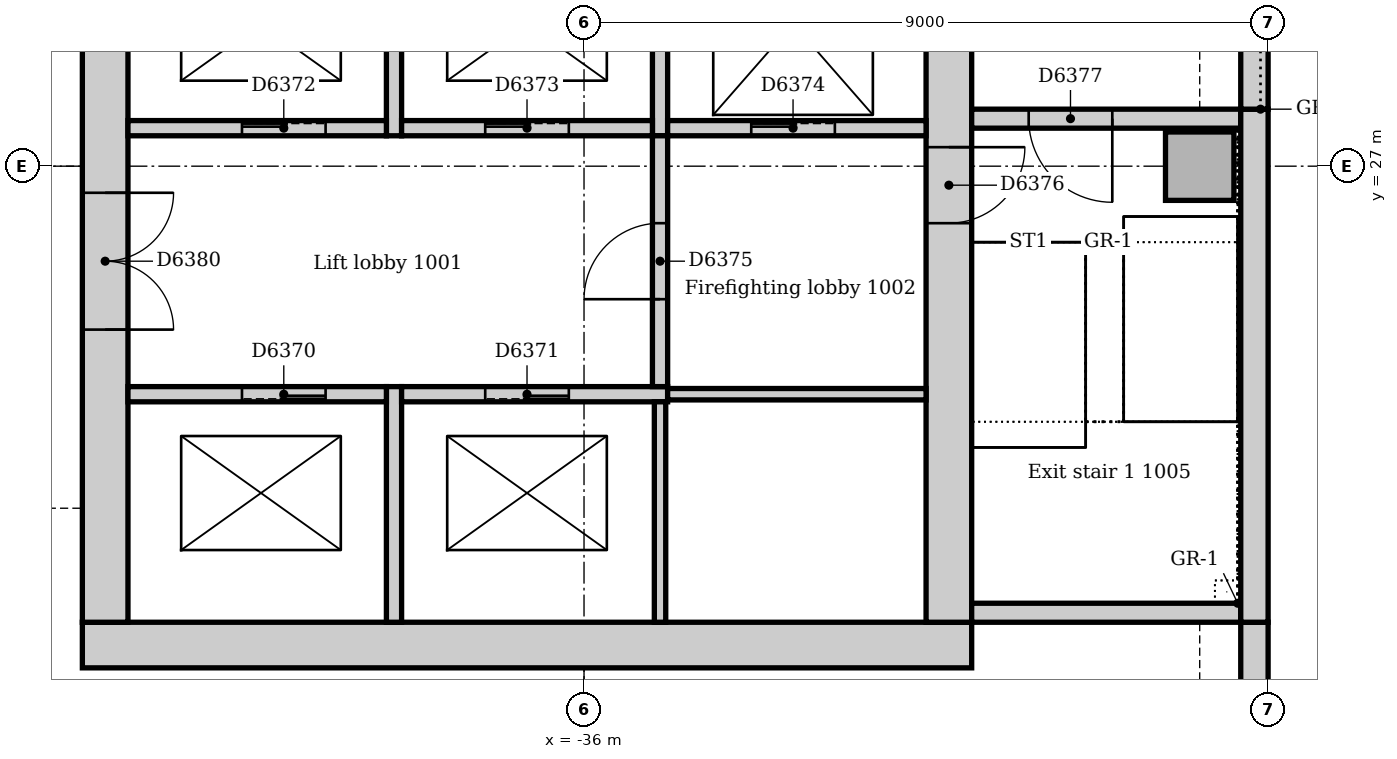
"""IFC4 building model, lengths in metres.
Left out: names, types, materials, properties, quantities, classifications, styles, units other than length and angle.
Written with IfcOpenShell. Run it as: python <this file> out.ifc"""

import sys

from ifc_helpers import new_model, si_unit, direction, frame, frame_2d, origin, origin_2d, place, context, subcontext, project, spatial, rectangle, extrude, element, fill, save


model = new_model("IFC4")
c1 = context("Model", 3, precision=1e-05, world=origin(), true_north=direction((0.0, 1.0)))
c2 = subcontext(c1, "Body", "Model", "MODEL_VIEW")
j1 = project(units=[si_unit("LENGTHUNIT", "METRE"), si_unit("PLANEANGLEUNIT", "RADIAN")], contexts=[c1])
p1 = place(None, origin())
s1 = spatial("IfcSite", under=j1, at=p1, CompositionType="ELEMENT")
p2 = place(p1, origin())
s2 = spatial("IfcBuilding", under=s1, at=p2, CompositionType="ELEMENT")
p3 = place(p2, frame((0.0, 0.0, 46.0)))
s3 = spatial("IfcBuildingStorey", under=s2, at=p3, CompositionType="ELEMENT", Elevation=46.0)
p4 = place(p3, frame((-42.6, 20.7, 0.0), z_axis=(0.0, 0.0, 1.0), x_axis=(1.0, 0.0, 0.0)))
e1 = element("IfcWall", 1, at=p4, inside=s3, PredefinedType="SOLIDWALL", context=c2, shape_type="SweptSolid", body=[
    extrude(rectangle(XDim=11.7, YDim=0.6, at=frame_2d((5.85, 0.0))), origin(), (0.0, 0.0, 1.0), 5.0),
])
p5 = place(p3, frame((-31.2, 21.0, 0.0), z_axis=(0.0, 0.0, 1.0), x_axis=(0.0, 1.0, 0.0)))
e2 = element("IfcWall", 2, at=p5, inside=s3, PredefinedType="SOLIDWALL", context=c2, shape_type="SweptSolid", body=[
    extrude(rectangle(XDim=9.5, YDim=0.6, at=frame_2d((4.75, 0.0))), origin(), (0.0, 0.0, 1.0), 5.0),
])
p6 = place(p5, frame((5.25, 0.0, 0.0)))
e3 = element("IfcOpeningElement", 3, at=p6, cuts=e2, PredefinedType="OPENING", context=c2, shape_type="SweptSolid", body=[
    extrude(rectangle(XDim=1.0, YDim=2.1, at=frame_2d((0.5, 1.05))), frame((0.0, 0.31, 0.0), z_axis=(0.0, -1.0, 0.0), x_axis=(1.0, 0.0, 0.0)), (0.0, 0.0, 1.0), 0.62),
])
p7 = place(p3, frame((-42.3, 30.5, 0.0), z_axis=(0.0, 0.0, 1.0), x_axis=(0.0, -1.0, 0.0)))
e4 = element("IfcWall", 4, at=p7, inside=s3, PredefinedType="SOLIDWALL", context=c2, shape_type="SweptSolid", body=[
    extrude(rectangle(XDim=9.5, YDim=0.6, at=frame_2d((4.75, 0.0))), origin(), (0.0, 0.0, 1.0), 5.0),
])
p8 = place(p7, frame((3.85, 0.0, 0.0)))
e5 = element("IfcOpeningElement", 5, at=p8, cuts=e4, PredefinedType="OPENING", context=c2, shape_type="SweptSolid", body=[
    extrude(rectangle(XDim=1.8, YDim=2.1, at=frame_2d((0.9, 1.05))), frame((0.0, 0.31, 0.0), z_axis=(0.0, -1.0, 0.0), x_axis=(1.0, 0.0, 0.0)), (0.0, 0.0, 1.0), 0.62),
])
p9 = place(p3, frame((-30.9, 21.125, 0.0), z_axis=(0.0, 0.0, 1.0), x_axis=(1.0, 0.0, 0.0)))
e6 = element("IfcWall", 6, at=p9, inside=s3, PredefinedType="SOLIDWALL", context=c2, shape_type="SweptSolid", body=[
    extrude(rectangle(XDim=3.54, YDim=0.25, at=frame_2d((1.77, 0.0))), origin(), (0.0, 0.0, 1.0), 5.0),
])
p10 = place(p3, frame((-27.36, 27.625, 0.0), z_axis=(0.0, 0.0, 1.0), x_axis=(-1.0, 0.0, 0.0)))
e7 = element("IfcWall", 7, at=p10, inside=s3, PredefinedType="SOLIDWALL", context=c2, shape_type="SweptSolid", body=[
    extrude(rectangle(XDim=3.54, YDim=0.25, at=frame_2d((1.77, 0.0))), origin(), (0.0, 0.0, 1.0), 5.0),
])
p11 = place(p10, frame((1.69, 0.0, 0.0)))
e8 = element("IfcOpeningElement", 8, at=p11, cuts=e7, PredefinedType="OPENING", context=c2, shape_type="SweptSolid", body=[
    extrude(rectangle(XDim=1.1, YDim=2.1, at=frame_2d((0.55, 1.05))), frame((0.0, 0.135, 0.0), z_axis=(0.0, -1.0, 0.0), x_axis=(1.0, 0.0, 0.0)), (0.0, 0.0, 1.0), 0.27),
])
p12 = place(p3, frame((-27.9, 27.0, 0.0), z_axis=(0.0, 0.0, 1.0), x_axis=(1.0, 0.0, 0.0)))
e9 = element("IfcColumn", 9, at=p12, inside=s3, PredefinedType="COLUMN", context=c2, shape_type="SweptSolid", body=[
    extrude(rectangle(XDim=0.9, YDim=0.9, at=origin_2d()), origin(), (0.0, 0.0, 1.0), 5.0),
])
p13 = place(p3, frame((-27.18, 8.743, 0.0), z_axis=(0.0, 0.0, 1.0), x_axis=(0.0, 1.0, 0.0)))
e10 = element("IfcWall", 10, at=p13, inside=s3, PredefinedType="STANDARD", context=c2, shape_type="SweptSolid", body=[
    extrude(rectangle(XDim=12.257, YDim=0.36, at=frame_2d((6.129, 0.0))), origin(), (0.0, 0.0, 1.0), 4.85),
])
p14 = place(p13, frame((3.107, 0.0, 0.9)))
e11 = element("IfcOpeningElement", 11, at=p14, cuts=e10, PredefinedType="OPENING", context=c2, shape_type="SweptSolid", body=[
    extrude(rectangle(XDim=3.3, YDim=2.2, at=frame_2d((1.65, 1.1))), frame((0.0, 0.19, 0.0), z_axis=(0.0, -1.0, 0.0), x_axis=(1.0, 0.0, 0.0)), (0.0, 0.0, 1.0), 0.38),
])
p15 = place(p13, frame((7.607, 0.0, 0.9)))
e12 = element("IfcOpeningElement", 12, at=p15, cuts=e10, PredefinedType="OPENING", context=c2, shape_type="SweptSolid", body=[
    extrude(rectangle(XDim=3.3, YDim=2.2, at=frame_2d((1.65, 1.1))), frame((0.0, 0.19, 0.0), z_axis=(0.0, -1.0, 0.0), x_axis=(1.0, 0.0, 0.0)), (0.0, 0.0, 1.0), 0.38),
])
p16 = place(p3, frame((-27.18, 21.0, 0.0), z_axis=(0.0, 0.0, 1.0), x_axis=(0.0, 1.0, 0.0)))
e13 = element("IfcWall", 13, at=p16, inside=s3, PredefinedType="STANDARD", context=c2, shape_type="SweptSolid", body=[
    extrude(rectangle(XDim=6.75, YDim=0.36, at=frame_2d((3.375, 0.0))), origin(), (0.0, 0.0, 1.0), 4.85),
])
p17 = place(p3, frame((-27.18, 27.75, 0.0), z_axis=(0.0, 0.0, 1.0), x_axis=(0.0, 1.0, 0.0)))
e14 = element("IfcWall", 14, at=p17, inside=s3, PredefinedType="STANDARD", context=c2, shape_type="SweptSolid", body=[
    extrude(rectangle(XDim=7.5, YDim=0.36, at=frame_2d((3.75, 0.0))), origin(), (0.0, 0.0, 1.0), 4.85),
])
p18 = place(p17, frame((2.85, 0.0, 1.2)))
e15 = element("IfcOpeningElement", 15, at=p18, cuts=e14, PredefinedType="OPENING", context=c2, shape_type="SweptSolid", body=[
    extrude(rectangle(XDim=1.8, YDim=1.2, at=frame_2d((0.9, 0.6))), frame((0.0, 0.19, 0.0), z_axis=(0.0, -1.0, 0.0), x_axis=(1.0, 0.0, 0.0)), (0.0, 0.0, 1.0), 0.38),
])
p19 = place(p3, frame((-38.5, 21.0, 0.0), z_axis=(0.0, 0.0, 1.0), x_axis=(0.0, 1.0, 0.0)))
e16 = element("IfcWall", 16, at=p19, inside=s3, PredefinedType="SOLIDWALL", context=c2, shape_type="SweptSolid", body=[
    extrude(rectangle(XDim=3.1, YDim=0.2, at=frame_2d((1.55, 0.0))), origin(), (0.0, 0.0, 1.0), 5.0),
])
p20 = place(p3, frame((-38.6, 24.0, 0.0), z_axis=(0.0, 0.0, 1.0), x_axis=(-1.0, 0.0, 0.0)))
e17 = element("IfcWall", 17, at=p20, inside=s3, PredefinedType="SOLIDWALL", context=c2, shape_type="SweptSolid", body=[
    extrude(rectangle(XDim=3.4, YDim=0.2, at=frame_2d((1.7, 0.0))), origin(), (0.0, 0.0, 1.0), 5.0),
])
p21 = place(p20, frame((0.8, 0.0, 0.0)))
e18 = element("IfcOpeningElement", 18, at=p21, cuts=e17, PredefinedType="OPENING", context=c2, shape_type="SweptSolid", body=[
    extrude(rectangle(XDim=1.1, YDim=2.1, at=frame_2d((0.55, 1.05))), frame((0.0, 0.11, 0.0), z_axis=(0.0, -1.0, 0.0), x_axis=(1.0, 0.0, 0.0)), (0.0, 0.0, 1.0), 0.22),
])
p22 = place(p3, frame((-34.9, 24.0, 0.0), z_axis=(0.0, 0.0, 1.0), x_axis=(-1.0, 0.0, 0.0)))
e19 = element("IfcWall", 19, at=p22, inside=s3, PredefinedType="SOLIDWALL", context=c2, shape_type="SweptSolid", body=[
    extrude(rectangle(XDim=3.5, YDim=0.2, at=frame_2d((1.75, 0.0))), origin(), (0.0, 0.0, 1.0), 5.0),
])
p23 = place(p22, frame((1.3, 0.0, 0.0)))
e20 = element("IfcOpeningElement", 20, at=p23, cuts=e19, PredefinedType="OPENING", context=c2, shape_type="SweptSolid", body=[
    extrude(rectangle(XDim=1.1, YDim=2.1, at=frame_2d((0.55, 1.05))), frame((0.0, 0.11, 0.0), z_axis=(0.0, -1.0, 0.0), x_axis=(1.0, 0.0, 0.0)), (0.0, 0.0, 1.0), 0.22),
])
p24 = place(p3, frame((-38.5, 27.4, 0.0), z_axis=(0.0, 0.0, 1.0), x_axis=(0.0, 1.0, 0.0)))
e21 = element("IfcWall", 21, at=p24, inside=s3, PredefinedType="SOLIDWALL", context=c2, shape_type="SweptSolid", body=[
    extrude(rectangle(XDim=2.85, YDim=0.2, at=frame_2d((1.425, 0.0))), origin(), (0.0, 0.0, 1.0), 5.0),
])
p25 = place(p3, frame((-42.0, 27.5, 0.0), z_axis=(0.0, 0.0, 1.0), x_axis=(1.0, 0.0, 0.0)))
e22 = element("IfcWall", 22, at=p25, inside=s3, PredefinedType="SOLIDWALL", context=c2, shape_type="SweptSolid", body=[
    extrude(rectangle(XDim=3.4, YDim=0.2, at=frame_2d((1.7, 0.0))), origin(), (0.0, 0.0, 1.0), 5.0),
])
p26 = place(p25, frame((1.5, 0.0, 0.0)))
e23 = element("IfcOpeningElement", 23, at=p26, cuts=e22, PredefinedType="OPENING", context=c2, shape_type="SweptSolid", body=[
    extrude(rectangle(XDim=1.1, YDim=2.1, at=frame_2d((0.55, 1.05))), frame((0.0, 0.11, 0.0), z_axis=(0.0, -1.0, 0.0), x_axis=(1.0, 0.0, 0.0)), (0.0, 0.0, 1.0), 0.22),
])
p27 = place(p3, frame((-35.0, 27.4, 0.0), z_axis=(0.0, 0.0, 1.0), x_axis=(0.0, 1.0, 0.0)))
e24 = element("IfcWall", 24, at=p27, inside=s3, PredefinedType="SOLIDWALL", context=c2, shape_type="SweptSolid", body=[
    extrude(rectangle(XDim=2.85, YDim=0.2, at=frame_2d((1.425, 0.0))), origin(), (0.0, 0.0, 1.0), 5.0),
])
p28 = place(p3, frame((-38.4, 27.5, 0.0), z_axis=(0.0, 0.0, 1.0), x_axis=(1.0, 0.0, 0.0)))
e25 = element("IfcWall", 25, at=p28, inside=s3, PredefinedType="SOLIDWALL", context=c2, shape_type="SweptSolid", body=[
    extrude(rectangle(XDim=3.3, YDim=0.2, at=frame_2d((1.65, 0.0))), origin(), (0.0, 0.0, 1.0), 5.0),
])
p29 = place(p28, frame((1.1, 0.0, 0.0)))
e26 = element("IfcOpeningElement", 26, at=p29, cuts=e25, PredefinedType="OPENING", context=c2, shape_type="SweptSolid", body=[
    extrude(rectangle(XDim=1.1, YDim=2.1, at=frame_2d((0.55, 1.05))), frame((0.0, 0.11, 0.0), z_axis=(0.0, -1.0, 0.0), x_axis=(1.0, 0.0, 0.0)), (0.0, 0.0, 1.0), 0.22),
])
p30 = place(p3, frame((-34.9, 27.5, 0.0), z_axis=(0.0, 0.0, 1.0), x_axis=(1.0, 0.0, 0.0)))
e27 = element("IfcWall", 27, at=p30, inside=s3, PredefinedType="SOLIDWALL", context=c2, shape_type="SweptSolid", body=[
    extrude(rectangle(XDim=3.4, YDim=0.2, at=frame_2d((1.7, 0.0))), origin(), (0.0, 0.0, 1.0), 5.0),
])
p31 = place(p30, frame((1.1, 0.0, 0.0)))
e28 = element("IfcOpeningElement", 28, at=p31, cuts=e27, PredefinedType="OPENING", context=c2, shape_type="SweptSolid", body=[
    extrude(rectangle(XDim=1.1, YDim=2.1, at=frame_2d((0.55, 1.05))), frame((0.0, 0.11, 0.0), z_axis=(0.0, -1.0, 0.0), x_axis=(1.0, 0.0, 0.0)), (0.0, 0.0, 1.0), 0.22),
])
p32 = place(p3, frame((-35.0, 24.1, 0.0), z_axis=(0.0, 0.0, 1.0), x_axis=(0.0, 1.0, 0.0)))
e29 = element("IfcWall", 29, at=p32, inside=s3, PredefinedType="SOLIDWALL", context=c2, shape_type="SweptSolid", body=[
    extrude(rectangle(XDim=3.3, YDim=0.2, at=frame_2d((1.65, 0.0))), origin(), (0.0, 0.0, 1.0), 5.0),
])
p33 = place(p32, frame((1.15, 0.0, 0.0)))
e30 = element("IfcOpeningElement", 30, at=p33, cuts=e29, PredefinedType="OPENING", context=c2, shape_type="SweptSolid", body=[
    extrude(rectangle(XDim=1.0, YDim=2.1, at=frame_2d((0.5, 1.05))), frame((0.0, 0.11, 0.0), z_axis=(0.0, -1.0, 0.0), x_axis=(1.0, 0.0, 0.0)), (0.0, 0.0, 1.0), 0.22),
])
p34 = place(p3, frame((-35.0, 21.0, 0.0), z_axis=(0.0, 0.0, 1.0), x_axis=(0.0, 1.0, 0.0)))
e31 = element("IfcWall", 31, at=p34, inside=s3, PredefinedType="SOLIDWALL", context=c2, shape_type="SweptSolid", body=[
    extrude(rectangle(XDim=2.9, YDim=0.15, at=frame_2d((1.45, 0.0))), origin(), (0.0, 0.0, 1.0), 5.0),
])
p35 = place(p3, frame((-31.5, 24.0, 0.0), z_axis=(0.0, 0.0, 1.0), x_axis=(-1.0, 0.0, 0.0)))
e32 = element("IfcWall", 32, at=p35, inside=s3, PredefinedType="SOLIDWALL", context=c2, shape_type="SweptSolid", body=[
    extrude(rectangle(XDim=3.4, YDim=0.15, at=frame_2d((1.7, 0.0))), origin(), (0.0, 0.0, 1.0), 5.0),
])
p36 = place(p21, origin())
e33 = element("IfcDoor", 33, at=p36, inside=s3, OperationType="SLIDING_TO_LEFT", PredefinedType="DOOR", context=c2, shape_type="SweptSolid", body=[
    extrude(rectangle(XDim=1.1, YDim=2.1, at=frame_2d((0.55, 1.05))), frame((0.0, 0.025, 0.0), z_axis=(0.0, -1.0, 0.0), x_axis=(1.0, 0.0, 0.0)), (0.0, 0.0, 1.0), 0.05),
])
fill(e18, e33)
p37 = place(p23, origin())
e34 = element("IfcDoor", 34, at=p37, inside=s3, OperationType="SLIDING_TO_LEFT", PredefinedType="DOOR", context=c2, shape_type="SweptSolid", body=[
    extrude(rectangle(XDim=1.1, YDim=2.1, at=frame_2d((0.55, 1.05))), frame((0.0, 0.025, 0.0), z_axis=(0.0, -1.0, 0.0), x_axis=(1.0, 0.0, 0.0)), (0.0, 0.0, 1.0), 0.05),
])
fill(e20, e34)
p38 = place(p26, origin())
e35 = element("IfcDoor", 35, at=p38, inside=s3, OperationType="SLIDING_TO_LEFT", PredefinedType="DOOR", context=c2, shape_type="SweptSolid", body=[
    extrude(rectangle(XDim=1.1, YDim=2.1, at=frame_2d((0.55, 1.05))), frame((0.0, 0.025, 0.0), z_axis=(0.0, -1.0, 0.0), x_axis=(1.0, 0.0, 0.0)), (0.0, 0.0, 1.0), 0.05),
])
fill(e23, e35)
p39 = place(p29, origin())
e36 = element("IfcDoor", 36, at=p39, inside=s3, OperationType="SLIDING_TO_LEFT", PredefinedType="DOOR", context=c2, shape_type="SweptSolid", body=[
    extrude(rectangle(XDim=1.1, YDim=2.1, at=frame_2d((0.55, 1.05))), frame((0.0, 0.025, 0.0), z_axis=(0.0, -1.0, 0.0), x_axis=(1.0, 0.0, 0.0)), (0.0, 0.0, 1.0), 0.05),
])
fill(e26, e36)
p40 = place(p31, origin())
e37 = element("IfcDoor", 37, at=p40, inside=s3, OperationType="SLIDING_TO_LEFT", PredefinedType="DOOR", context=c2, shape_type="SweptSolid", body=[
    extrude(rectangle(XDim=1.1, YDim=2.1, at=frame_2d((0.55, 1.05))), frame((0.0, 0.025, 0.0), z_axis=(0.0, -1.0, 0.0), x_axis=(1.0, 0.0, 0.0)), (0.0, 0.0, 1.0), 0.05),
])
fill(e28, e37)
p41 = place(p33, origin())
e38 = element("IfcDoor", 38, at=p41, inside=s3, OperationType="SINGLE_SWING_LEFT", PredefinedType="DOOR", context=c2, shape_type="SweptSolid", body=[
    extrude(rectangle(XDim=1.0, YDim=2.1, at=frame_2d((0.5, 1.05))), frame((0.0, 0.025, 0.0), z_axis=(0.0, -1.0, 0.0), x_axis=(1.0, 0.0, 0.0)), (0.0, 0.0, 1.0), 0.05),
])
fill(e30, e38)
p42 = place(p6, frame((1.0, 0.0, 0.0), z_axis=(0.0, 0.0, 1.0), x_axis=(-1.0, 0.0, 0.0)))
e39 = element("IfcDoor", 39, at=p42, inside=s3, OperationType="SINGLE_SWING_LEFT", PredefinedType="DOOR", context=c2, shape_type="SweptSolid", body=[
    extrude(rectangle(XDim=1.0, YDim=2.1, at=frame_2d((0.5, 1.05))), frame((0.0, 0.025, 0.0), z_axis=(0.0, -1.0, 0.0), x_axis=(1.0, 0.0, 0.0)), (0.0, 0.0, 1.0), 0.05),
])
fill(e3, e39)
p43 = place(p11, origin())
e40 = element("IfcDoor", 40, at=p43, inside=s3, OperationType="SINGLE_SWING_LEFT", PredefinedType="DOOR", context=c2, shape_type="SweptSolid", body=[
    extrude(rectangle(XDim=1.1, YDim=2.1, at=frame_2d((0.55, 1.05))), frame((0.0, 0.025, 0.0), z_axis=(0.0, -1.0, 0.0), x_axis=(1.0, 0.0, 0.0)), (0.0, 0.0, 1.0), 0.05),
])
fill(e8, e40)
p44 = place(p8, origin())
e41 = element("IfcDoor", 41, at=p44, inside=s3, OperationType="DOUBLE_DOOR_SINGLE_SWING", PredefinedType="DOOR", context=c2, shape_type="SweptSolid", body=[
    extrude(rectangle(XDim=1.8, YDim=2.1, at=frame_2d((0.9, 1.05))), frame((0.0, 0.025, 0.0), z_axis=(0.0, -1.0, 0.0), x_axis=(1.0, 0.0, 0.0)), (0.0, 0.0, 1.0), 0.05),
])
fill(e5, e41)
save(model, sys.argv[1])
